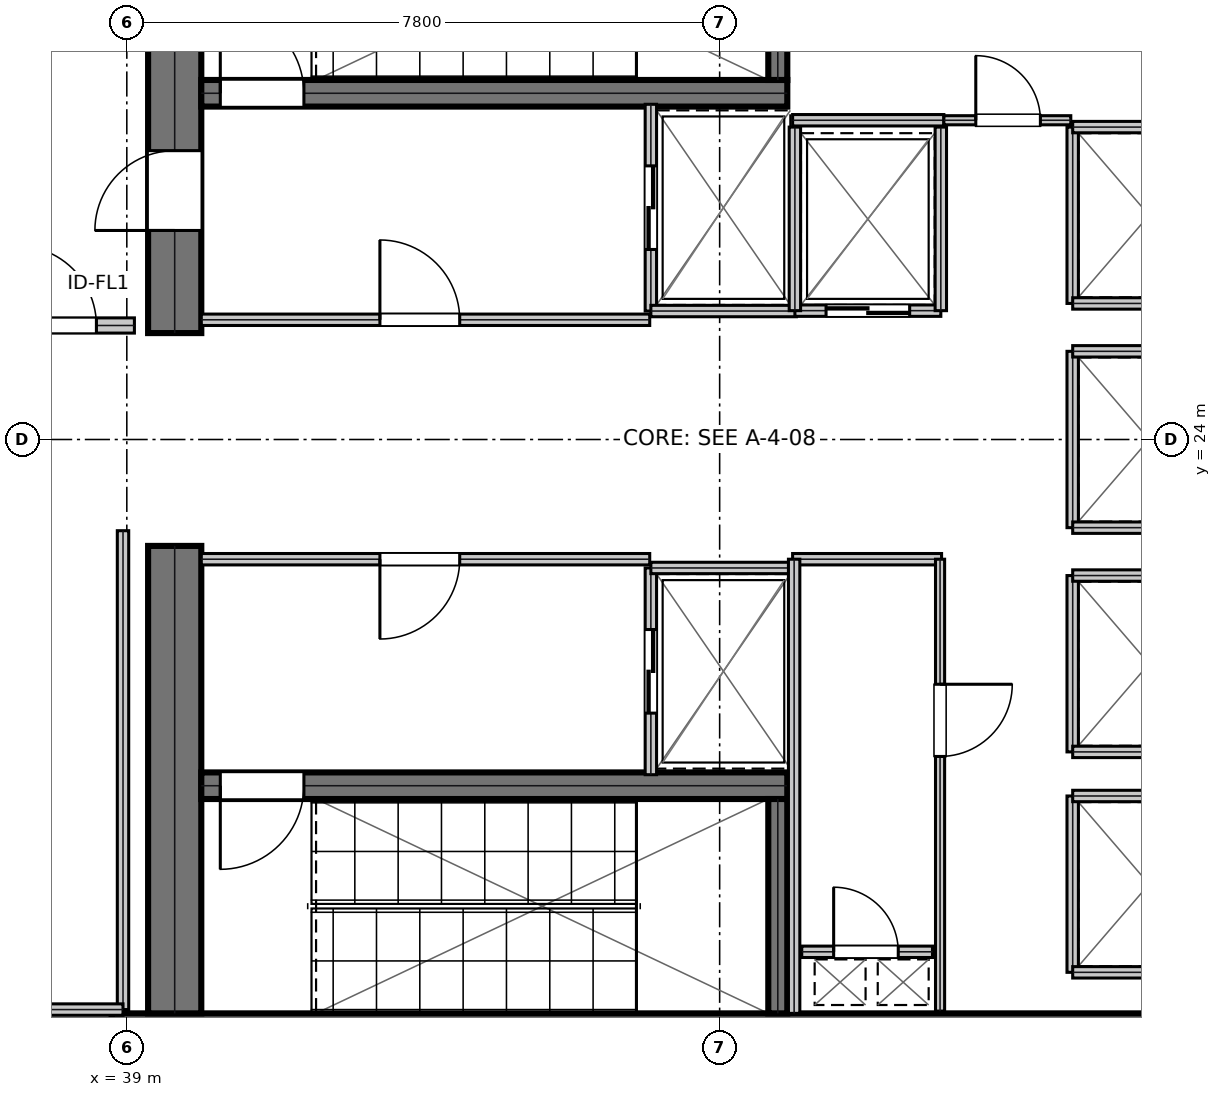
"""IFC4 building model, lengths in metres.
Left out: names, types, materials, properties, quantities, classifications, styles, units other than length and angle.
Written with IfcOpenShell. Run it as: python <this file> out.ifc"""

import sys

from ifc_helpers import new_model, si_unit, direction, frame, frame_2d, origin, place, context, subcontext, project, spatial, rectangle, extrude, element, fill, save


model = new_model("IFC4")
c1 = context("Model", 3, precision=1e-05, world=origin(), true_north=direction((0.0, 1.0)))
c2 = subcontext(c1, "Body", "Model", "MODEL_VIEW")
j1 = project(units=[si_unit("LENGTHUNIT", "METRE"), si_unit("PLANEANGLEUNIT", "RADIAN")], contexts=[c1])
p1 = place(None, origin())
s1 = spatial("IfcSite", under=j1, at=p1, CompositionType="ELEMENT")
p2 = place(p1, origin())
s2 = spatial("IfcBuilding", under=s1, at=p2, CompositionType="ELEMENT")
p3 = place(p2, frame((0.0, 0.0, 181.65)))
s3 = spatial("IfcBuildingStorey", under=s2, at=p3, CompositionType="ELEMENT", Elevation=181.65)
p4 = place(p3, frame((38.8, 16.1, 0.0), z_axis=(0.0, 0.0, 1.0), x_axis=(1.0, 0.0, 0.0)))
e1 = element("IfcWall", 1, at=p4, inside=s3, PredefinedType="SHEAR", context=c2, shape_type="SweptSolid", body=[
    extrude(rectangle(XDim=16.0, YDim=0.7, at=frame_2d((8.0, 0.0))), origin(), (0.0, 0.0, 1.0), 5.12),
])
p5 = place(p3, frame((39.63, 16.45, 0.0), z_axis=(0.0, 0.0, 1.0), x_axis=(0.0, 1.0, 0.0)))
e2 = element("IfcWall", 2, at=p5, inside=s3, PredefinedType="SHEAR", context=c2, shape_type="SweptSolid", body=[
    extrude(rectangle(XDim=6.15, YDim=0.7, at=frame_2d((3.075, 0.0))), origin(), (0.0, 0.0, 1.0), 5.12),
])
p6 = place(p3, frame((39.63, 25.4, 0.0), z_axis=(0.0, 0.0, 1.0), x_axis=(0.0, 1.0, 0.0)))
e3 = element("IfcWall", 3, at=p6, inside=s3, PredefinedType="SHEAR", context=c2, shape_type="SweptSolid", body=[
    extrude(rectangle(XDim=6.15, YDim=0.7, at=frame_2d((3.075, 0.0))), origin(), (0.0, 0.0, 1.0), 5.12),
])
p7 = place(p6, frame((1.35, 0.0, 0.0)))
e4 = element("IfcOpeningElement", 4, at=p7, cuts=e3, PredefinedType="OPENING", context=c2, shape_type="SweptSolid", body=[
    extrude(rectangle(XDim=1.05, YDim=2.15, at=frame_2d((0.525, 1.075))), frame((0.0, 0.36, 0.0), z_axis=(0.0, -1.0, 0.0), x_axis=(1.0, 0.0, 0.0)), (0.0, 0.0, 1.0), 0.72),
])
p8 = place(p3, frame((39.98, 28.555, 0.0), z_axis=(0.0, 0.0, 1.0), x_axis=(1.0, 0.0, 0.0)))
e5 = element("IfcWall", 5, at=p8, inside=s3, PredefinedType="SHEAR", context=c2, shape_type="SweptSolid", body=[
    extrude(rectangle(XDim=7.71, YDim=0.35, at=frame_2d((3.855, 0.0))), origin(), (0.0, 0.0, 1.0), 5.12),
])
p9 = place(p8, frame((0.25, 0.0, 0.0)))
e6 = element("IfcOpeningElement", 6, at=p9, cuts=e5, PredefinedType="OPENING", context=c2, shape_type="SweptSolid", body=[
    extrude(rectangle(XDim=1.1, YDim=2.15, at=frame_2d((0.55, 1.075))), frame((0.0, 0.185, 0.0), z_axis=(0.0, -1.0, 0.0), x_axis=(1.0, 0.0, 0.0)), (0.0, 0.0, 1.0), 0.37),
])
p10 = place(p3, frame((39.98, 19.445, 0.0), z_axis=(0.0, 0.0, 1.0), x_axis=(1.0, 0.0, 0.0)))
e7 = element("IfcWall", 7, at=p10, inside=s3, PredefinedType="SHEAR", context=c2, shape_type="SweptSolid", body=[
    extrude(rectangle(XDim=7.71, YDim=0.35, at=frame_2d((3.855, 0.0))), origin(), (0.0, 0.0, 1.0), 5.12),
])
p11 = place(p10, frame((0.25, 0.0, 0.0)))
e8 = element("IfcOpeningElement", 8, at=p11, cuts=e7, PredefinedType="OPENING", context=c2, shape_type="SweptSolid", body=[
    extrude(rectangle(XDim=1.1, YDim=2.15, at=frame_2d((0.55, 1.075))), frame((0.0, 0.185, 0.0), z_axis=(0.0, -1.0, 0.0), x_axis=(1.0, 0.0, 0.0)), (0.0, 0.0, 1.0), 0.37),
])
for number, where, z_axis, x_axis in (
    (9, (47.565, 28.73, 0.0), (0.0, 0.0, 1.0), (0.0, 1.0, 0.0)),
    (10, (47.565, 16.45, 0.0), (0.0, 0.0, 1.0), (0.0, 1.0, 0.0)),
):
    element("IfcWall", number, at=place(p3, frame(where, z_axis=z_axis, x_axis=x_axis)), inside=s3, PredefinedType="SHEAR", context=c2, shape_type="SweptSolid", body=[
        extrude(rectangle(XDim=2.82, YDim=0.25, at=frame_2d((1.41, 0.0))), origin(), (0.0, 0.0, 1.0), 5.12),
    ])
p12 = place(p3, frame((39.98, 25.575, 0.0), z_axis=(0.0, 0.0, 1.0), x_axis=(1.0, 0.0, 0.0)))
e11 = element("IfcWall", 11, at=p12, inside=s3, PredefinedType="PARTITIONING", context=c2, shape_type="SweptSolid", body=[
    extrude(rectangle(XDim=5.9, YDim=0.15, at=frame_2d((2.95, 0.0))), origin(), (0.0, 0.0, 1.0), 5.12),
])
p13 = place(p12, frame((2.35, 0.0, 0.0)))
e12 = element("IfcOpeningElement", 12, at=p13, cuts=e11, PredefinedType="OPENING", context=c2, shape_type="SweptSolid", body=[
    extrude(rectangle(XDim=1.05, YDim=2.15, at=frame_2d((0.525, 1.075))), frame((0.0, 0.085, 0.0), z_axis=(0.0, -1.0, 0.0), x_axis=(1.0, 0.0, 0.0)), (0.0, 0.0, 1.0), 0.17),
])
p14 = place(p3, frame((39.98, 22.425, 0.0), z_axis=(0.0, 0.0, 1.0), x_axis=(1.0, 0.0, 0.0)))
e13 = element("IfcWall", 13, at=p14, inside=s3, PredefinedType="PARTITIONING", context=c2, shape_type="SweptSolid", body=[
    extrude(rectangle(XDim=5.9, YDim=0.15, at=frame_2d((2.95, 0.0))), origin(), (0.0, 0.0, 1.0), 5.12),
])
p15 = place(p14, frame((2.35, 0.0, 0.0)))
e14 = element("IfcOpeningElement", 14, at=p15, cuts=e13, PredefinedType="OPENING", context=c2, shape_type="SweptSolid", body=[
    extrude(rectangle(XDim=1.05, YDim=2.15, at=frame_2d((0.525, 1.075))), frame((0.0, 0.085, 0.0), z_axis=(0.0, -1.0, 0.0), x_axis=(1.0, 0.0, 0.0)), (0.0, 0.0, 1.0), 0.17),
])
p16 = place(p3, frame((45.895, 25.69, 0.0), z_axis=(0.0, 0.0, 1.0), x_axis=(0.0, 1.0, 0.0)))
e15 = element("IfcWall", 15, at=p16, inside=s3, PredefinedType="PARTITIONING", context=c2, shape_type="SweptSolid", body=[
    extrude(rectangle(XDim=2.72, YDim=0.15, at=frame_2d((1.36, 0.0))), origin(), (0.0, 0.0, 1.0), 5.12),
])
p17 = place(p16, frame((0.81, 0.0, 0.0)))
e16 = element("IfcOpeningElement", 16, at=p17, cuts=e15, PredefinedType="OPENING", context=c2, shape_type="SweptSolid", body=[
    extrude(rectangle(XDim=1.1, YDim=2.15, at=frame_2d((0.55, 1.075))), frame((0.0, 0.085, 0.0), z_axis=(0.0, -1.0, 0.0), x_axis=(1.0, 0.0, 0.0)), (0.0, 0.0, 1.0), 0.17),
])
p18 = place(p3, frame((45.895, 25.69, 0.0), z_axis=(0.0, 0.0, 1.0), x_axis=(1.0, 0.0, 0.0)))
e17 = element("IfcWall", 17, at=p18, inside=s3, PredefinedType="PARTITIONING", context=c2, shape_type="SweptSolid", body=[
    extrude(rectangle(XDim=1.915, YDim=0.15, at=frame_2d((0.958, 0.0))), origin(), (0.0, 0.0, 1.0), 5.12),
])
p19 = place(p3, frame((45.895, 19.59, 0.0), z_axis=(0.0, 0.0, 1.0), x_axis=(0.0, 1.0, 0.0)))
e18 = element("IfcWall", 18, at=p19, inside=s3, PredefinedType="PARTITIONING", context=c2, shape_type="SweptSolid", body=[
    extrude(rectangle(XDim=2.72, YDim=0.15, at=frame_2d((1.36, 0.0))), origin(), (0.0, 0.0, 1.0), 5.12),
])
p20 = place(p19, frame((0.81, 0.0, 0.0)))
e19 = element("IfcOpeningElement", 19, at=p20, cuts=e18, PredefinedType="OPENING", context=c2, shape_type="SweptSolid", body=[
    extrude(rectangle(XDim=1.1, YDim=2.15, at=frame_2d((0.55, 1.075))), frame((0.0, 0.085, 0.0), z_axis=(0.0, -1.0, 0.0), x_axis=(1.0, 0.0, 0.0)), (0.0, 0.0, 1.0), 0.17),
])
p21 = place(p3, frame((45.895, 22.31, 0.0), z_axis=(0.0, 0.0, 1.0), x_axis=(1.0, 0.0, 0.0)))
e20 = element("IfcWall", 20, at=p21, inside=s3, PredefinedType="PARTITIONING", context=c2, shape_type="SweptSolid", body=[
    extrude(rectangle(XDim=1.915, YDim=0.15, at=frame_2d((0.958, 0.0))), origin(), (0.0, 0.0, 1.0), 5.12),
])
p22 = place(p3, frame((47.79, 25.695, 0.0), z_axis=(0.0, 0.0, 1.0), x_axis=(1.0, 0.0, 0.0)))
e21 = element("IfcWall", 21, at=p22, inside=s3, PredefinedType="PARTITIONING", context=c2, shape_type="SweptSolid", body=[
    extrude(rectangle(XDim=1.92, YDim=0.15, at=frame_2d((0.96, 0.0))), origin(), (0.0, 0.0, 1.0), 5.12),
])
p23 = place(p22, frame((0.41, 0.0, 0.0)))
e22 = element("IfcOpeningElement", 22, at=p23, cuts=e21, PredefinedType="OPENING", context=c2, shape_type="SweptSolid", body=[
    extrude(rectangle(XDim=1.1, YDim=2.15, at=frame_2d((0.55, 1.075))), frame((0.0, 0.085, 0.0), z_axis=(0.0, -1.0, 0.0), x_axis=(1.0, 0.0, 0.0)), (0.0, 0.0, 1.0), 0.17),
])
for number, where, z_axis, x_axis in (
    (23, (47.79, 25.695, 0.0), (0.0, 0.0, 1.0), (0.0, 1.0, 0.0)),
    (24, (49.71, 25.695, 0.0), (0.0, 0.0, 1.0), (0.0, 1.0, 0.0)),
):
    element("IfcWall", number, at=place(p3, frame(where, z_axis=z_axis, x_axis=x_axis)), inside=s3, PredefinedType="PARTITIONING", context=c2, shape_type="SweptSolid", body=[
        extrude(rectangle(XDim=2.415, YDim=0.15, at=frame_2d((1.208, 0.0))), origin(), (0.0, 0.0, 1.0), 5.12),
    ])
p24 = place(p3, frame((51.445, 25.79, 0.0), z_axis=(0.0, 0.0, 1.0), x_axis=(0.0, 1.0, 0.0)))
e25 = element("IfcWall", 25, at=p24, inside=s3, PredefinedType="PARTITIONING", context=c2, shape_type="SweptSolid", body=[
    extrude(rectangle(XDim=2.32, YDim=0.15, at=frame_2d((1.16, 0.0))), origin(), (0.0, 0.0, 1.0), 5.12),
])
for number, where, z_axis, x_axis in (
    (26, (51.445, 25.79, 0.0), (0.0, 0.0, 1.0), (1.0, 0.0, 0.0)),
    (27, (51.445, 28.11, 0.0), (0.0, 0.0, 1.0), (1.0, 0.0, 0.0)),
):
    element("IfcWall", number, at=place(p3, frame(where, z_axis=z_axis, x_axis=x_axis)), inside=s3, PredefinedType="PARTITIONING", context=c2, shape_type="SweptSolid", body=[
        extrude(rectangle(XDim=2.015, YDim=0.15, at=frame_2d((1.007, 0.0))), origin(), (0.0, 0.0, 1.0), 5.12),
    ])
p25 = place(p3, frame((51.445, 19.89, 0.0), z_axis=(0.0, 0.0, 1.0), x_axis=(0.0, 1.0, 0.0)))
e28 = element("IfcWall", 28, at=p25, inside=s3, PredefinedType="PARTITIONING", context=c2, shape_type="SweptSolid", body=[
    extrude(rectangle(XDim=2.32, YDim=0.15, at=frame_2d((1.16, 0.0))), origin(), (0.0, 0.0, 1.0), 5.12),
])
for number, where, z_axis, x_axis in (
    (29, (51.445, 19.89, 0.0), (0.0, 0.0, 1.0), (1.0, 0.0, 0.0)),
    (30, (51.445, 22.21, 0.0), (0.0, 0.0, 1.0), (1.0, 0.0, 0.0)),
):
    element("IfcWall", number, at=place(p3, frame(where, z_axis=z_axis, x_axis=x_axis)), inside=s3, PredefinedType="PARTITIONING", context=c2, shape_type="SweptSolid", body=[
        extrude(rectangle(XDim=2.015, YDim=0.15, at=frame_2d((1.007, 0.0))), origin(), (0.0, 0.0, 1.0), 5.12),
    ])
p26 = place(p3, frame((51.445, 22.84, 0.0), z_axis=(0.0, 0.0, 1.0), x_axis=(0.0, 1.0, 0.0)))
e31 = element("IfcWall", 31, at=p26, inside=s3, PredefinedType="PARTITIONING", context=c2, shape_type="SweptSolid", body=[
    extrude(rectangle(XDim=2.32, YDim=0.15, at=frame_2d((1.16, 0.0))), origin(), (0.0, 0.0, 1.0), 5.12),
])
for number, where, z_axis, x_axis in (
    (32, (51.445, 22.84, 0.0), (0.0, 0.0, 1.0), (1.0, 0.0, 0.0)),
    (33, (51.445, 25.16, 0.0), (0.0, 0.0, 1.0), (1.0, 0.0, 0.0)),
):
    element("IfcWall", number, at=place(p3, frame(where, z_axis=z_axis, x_axis=x_axis)), inside=s3, PredefinedType="PARTITIONING", context=c2, shape_type="SweptSolid", body=[
        extrude(rectangle(XDim=2.015, YDim=0.15, at=frame_2d((1.007, 0.0))), origin(), (0.0, 0.0, 1.0), 5.12),
    ])
p27 = place(p3, frame((51.445, 16.99, 0.0), z_axis=(0.0, 0.0, 1.0), x_axis=(0.0, 1.0, 0.0)))
e34 = element("IfcWall", 34, at=p27, inside=s3, PredefinedType="PARTITIONING", context=c2, shape_type="SweptSolid", body=[
    extrude(rectangle(XDim=2.32, YDim=0.15, at=frame_2d((1.16, 0.0))), origin(), (0.0, 0.0, 1.0), 5.12),
])
for number, where, z_axis, x_axis in (
    (35, (51.445, 16.99, 0.0), (0.0, 0.0, 1.0), (1.0, 0.0, 0.0)),
    (36, (51.445, 19.31, 0.0), (0.0, 0.0, 1.0), (1.0, 0.0, 0.0)),
):
    element("IfcWall", number, at=place(p3, frame(where, z_axis=z_axis, x_axis=x_axis)), inside=s3, PredefinedType="PARTITIONING", context=c2, shape_type="SweptSolid", body=[
        extrude(rectangle(XDim=2.015, YDim=0.15, at=frame_2d((1.007, 0.0))), origin(), (0.0, 0.0, 1.0), 5.12),
    ])
p28 = place(p3, frame((47.88, 17.26, 0.0), z_axis=(0.0, 0.0, 1.0), x_axis=(1.0, 0.0, 0.0)))
e37 = element("IfcWall", 37, at=p28, inside=s3, PredefinedType="PARTITIONING", context=c2, shape_type="SweptSolid", body=[
    extrude(rectangle(XDim=1.72, YDim=0.15, at=frame_2d((0.86, 0.0))), origin(), (0.0, 0.0, 1.0), 5.12),
])
p29 = place(p28, frame((0.42, 0.0, 0.0)))
e38 = element("IfcOpeningElement", 38, at=p29, cuts=e37, PredefinedType="OPENING", context=c2, shape_type="SweptSolid", body=[
    extrude(rectangle(XDim=0.85, YDim=2.15, at=frame_2d((0.425, 1.075))), frame((0.0, 0.085, 0.0), z_axis=(0.0, -1.0, 0.0), x_axis=(1.0, 0.0, 0.0)), (0.0, 0.0, 1.0), 0.17),
])
p30 = place(p3, frame((47.76, 22.425, 0.0), z_axis=(0.0, 0.0, 1.0), x_axis=(1.0, 0.0, 0.0)))
e39 = element("IfcWall", 39, at=p30, inside=s3, PredefinedType="PARTITIONING", context=c2, shape_type="SweptSolid", body=[
    extrude(rectangle(XDim=1.96, YDim=0.15, at=frame_2d((0.98, 0.0))), origin(), (0.0, 0.0, 1.0), 5.12),
])
p31 = place(p3, frame((47.78, 16.45, 0.0), z_axis=(0.0, 0.0, 1.0), x_axis=(0.0, 1.0, 0.0)))
e40 = element("IfcWall", 40, at=p31, inside=s3, PredefinedType="PARTITIONING", context=c2, shape_type="SweptSolid", body=[
    extrude(rectangle(XDim=5.975, YDim=0.15, at=frame_2d((2.988, 0.0))), origin(), (0.0, 0.0, 1.0), 5.12),
])
p32 = place(p3, frame((49.7, 16.48, 0.0), z_axis=(0.0, 0.0, 1.0), x_axis=(0.0, 1.0, 0.0)))
e41 = element("IfcWall", 41, at=p32, inside=s3, PredefinedType="PARTITIONING", context=c2, shape_type="SweptSolid", body=[
    extrude(rectangle(XDim=5.945, YDim=0.12, at=frame_2d((2.973, 0.0))), origin(), (0.0, 0.0, 1.0), 5.12),
])
p33 = place(p32, frame((3.35, 0.0, 0.0)))
e42 = element("IfcOpeningElement", 42, at=p33, cuts=e41, PredefinedType="OPENING", context=c2, shape_type="SweptSolid", body=[
    extrude(rectangle(XDim=0.95, YDim=2.15, at=frame_2d((0.475, 1.075))), frame((0.0, 0.07, 0.0), z_axis=(0.0, -1.0, 0.0), x_axis=(1.0, 0.0, 0.0)), (0.0, 0.0, 1.0), 0.14),
])
p34 = place(p3, frame((47.76, 28.2, 0.0), z_axis=(0.0, 0.0, 1.0), x_axis=(1.0, 0.0, 0.0)))
e43 = element("IfcWall", 43, at=p34, inside=s3, PredefinedType="PARTITIONING", context=c2, shape_type="SweptSolid", body=[
    extrude(rectangle(XDim=1.99, YDim=0.15, at=frame_2d((0.995, 0.0))), origin(), (0.0, 0.0, 1.0), 5.12),
])
p35 = place(p3, frame((49.75, 28.2, 0.0), z_axis=(0.0, 0.0, 1.0), x_axis=(1.0, 0.0, 0.0)))
e44 = element("IfcWall", 44, at=p35, inside=s3, PredefinedType="PARTITIONING", context=c2, shape_type="SweptSolid", body=[
    extrude(rectangle(XDim=1.67, YDim=0.12, at=frame_2d((0.835, 0.0))), origin(), (0.0, 0.0, 1.0), 5.12),
])
p36 = place(p35, frame((0.42, 0.0, 0.0)))
e45 = element("IfcOpeningElement", 45, at=p36, cuts=e44, PredefinedType="OPENING", context=c2, shape_type="SweptSolid", body=[
    extrude(rectangle(XDim=0.85, YDim=2.15, at=frame_2d((0.425, 1.075))), frame((0.0, 0.07, 0.0), z_axis=(0.0, -1.0, 0.0), x_axis=(1.0, 0.0, 0.0)), (0.0, 0.0, 1.0), 0.14),
])
p37 = place(p3, frame((22.15, 25.5, 0.0), z_axis=(0.0, 0.0, 1.0), x_axis=(1.0, 0.0, 0.0)))
e46 = element("IfcWall", 46, at=p37, inside=s3, PredefinedType="SOLIDWALL", context=c2, shape_type="SweptSolid", body=[
    extrude(rectangle(XDim=16.95, YDim=0.2, at=frame_2d((8.475, 0.0))), origin(), (0.0, 0.0, 1.0), 4.571),
])
p38 = place(p37, frame((15.4, 0.0, 0.0)))
e47 = element("IfcOpeningElement", 47, at=p38, cuts=e46, PredefinedType="OPENING", context=c2, shape_type="SweptSolid", body=[
    extrude(rectangle(XDim=1.05, YDim=2.15, at=frame_2d((0.525, 1.075))), frame((0.0, 0.11, 0.0), z_axis=(0.0, -1.0, 0.0), x_axis=(1.0, 0.0, 0.0)), (0.0, 0.0, 1.0), 0.22),
])
p39 = place(p3, frame((38.95, 16.5, 0.0), z_axis=(0.0, 0.0, 1.0), x_axis=(0.0, 1.0, 0.0)))
e48 = element("IfcWall", 48, at=p39, inside=s3, PredefinedType="PARTITIONING", context=c2, shape_type="SweptSolid", body=[
    extrude(rectangle(XDim=6.3, YDim=0.15, at=frame_2d((3.15, 0.0))), origin(), (0.0, 0.0, 1.0), 4.798),
])
p40 = place(p3, frame((37.05, 16.5, 0.0), z_axis=(0.0, 0.0, 1.0), x_axis=(1.0, 0.0, 0.0)))
e49 = element("IfcWall", 49, at=p40, inside=s3, PredefinedType="PARTITIONING", context=c2, shape_type="SweptSolid", body=[
    extrude(rectangle(XDim=1.9, YDim=0.15, at=frame_2d((0.95, 0.0))), origin(), (0.0, 0.0, 1.0), 5.12),
])
p41 = place(p13, origin())
e50 = element("IfcDoor", 50, at=p41, inside=s3, OperationType="SINGLE_SWING_LEFT", PredefinedType="DOOR", context=c2, shape_type="SweptSolid", body=[
    extrude(rectangle(XDim=1.05, YDim=2.15, at=frame_2d((0.525, 1.075))), frame((0.0, 0.025, 0.0), z_axis=(0.0, -1.0, 0.0), x_axis=(1.0, 0.0, 0.0)), (0.0, 0.0, 1.0), 0.05),
])
fill(e12, e50)
p42 = place(p15, frame((1.05, 0.0, 0.0), z_axis=(0.0, 0.0, 1.0), x_axis=(-1.0, 0.0, 0.0)))
e51 = element("IfcDoor", 51, at=p42, inside=s3, OperationType="SINGLE_SWING_RIGHT", PredefinedType="DOOR", context=c2, shape_type="SweptSolid", body=[
    extrude(rectangle(XDim=1.05, YDim=2.15, at=frame_2d((0.525, 1.075))), frame((0.0, 0.025, 0.0), z_axis=(0.0, -1.0, 0.0), x_axis=(1.0, 0.0, 0.0)), (0.0, 0.0, 1.0), 0.05),
])
fill(e14, e51)
p43 = place(p17, frame((1.1, 0.0, 0.0), z_axis=(0.0, 0.0, 1.0), x_axis=(-1.0, 0.0, 0.0)))
e52 = element("IfcDoor", 52, at=p43, inside=s3, OperationType="DOUBLE_DOOR_SLIDING", PredefinedType="DOOR", context=c2, shape_type="SweptSolid", body=[
    extrude(rectangle(XDim=1.1, YDim=2.15, at=frame_2d((0.55, 1.075))), frame((0.0, 0.025, 0.0), z_axis=(0.0, -1.0, 0.0), x_axis=(1.0, 0.0, 0.0)), (0.0, 0.0, 1.0), 0.05),
])
fill(e16, e52)
p44 = place(p20, frame((1.1, 0.0, 0.0), z_axis=(0.0, 0.0, 1.0), x_axis=(-1.0, 0.0, 0.0)))
e53 = element("IfcDoor", 53, at=p44, inside=s3, OperationType="DOUBLE_DOOR_SLIDING", PredefinedType="DOOR", context=c2, shape_type="SweptSolid", body=[
    extrude(rectangle(XDim=1.1, YDim=2.15, at=frame_2d((0.55, 1.075))), frame((0.0, 0.025, 0.0), z_axis=(0.0, -1.0, 0.0), x_axis=(1.0, 0.0, 0.0)), (0.0, 0.0, 1.0), 0.05),
])
fill(e19, e53)
p45 = place(p23, frame((1.1, 0.0, 0.0), z_axis=(0.0, 0.0, 1.0), x_axis=(-1.0, 0.0, 0.0)))
e54 = element("IfcDoor", 54, at=p45, inside=s3, OperationType="DOUBLE_DOOR_SLIDING", PredefinedType="DOOR", context=c2, shape_type="SweptSolid", body=[
    extrude(rectangle(XDim=1.1, YDim=2.15, at=frame_2d((0.55, 1.075))), frame((0.0, 0.025, 0.0), z_axis=(0.0, -1.0, 0.0), x_axis=(1.0, 0.0, 0.0)), (0.0, 0.0, 1.0), 0.05),
])
fill(e22, e54)
p46 = place(p29, origin())
e55 = element("IfcDoor", 55, at=p46, inside=s3, OperationType="SINGLE_SWING_LEFT", PredefinedType="TRAPDOOR", context=c2, shape_type="SweptSolid", body=[
    extrude(rectangle(XDim=0.85, YDim=2.15, at=frame_2d((0.425, 1.075))), frame((0.0, 0.025, 0.0), z_axis=(0.0, -1.0, 0.0), x_axis=(1.0, 0.0, 0.0)), (0.0, 0.0, 1.0), 0.05),
])
fill(e38, e55)
p47 = place(p33, frame((0.95, 0.0, 0.0), z_axis=(0.0, 0.0, 1.0), x_axis=(-1.0, 0.0, 0.0)))
e56 = element("IfcDoor", 56, at=p47, inside=s3, OperationType="SINGLE_SWING_LEFT", PredefinedType="DOOR", context=c2, shape_type="SweptSolid", body=[
    extrude(rectangle(XDim=0.95, YDim=2.15, at=frame_2d((0.475, 1.075))), frame((0.0, 0.025, 0.0), z_axis=(0.0, -1.0, 0.0), x_axis=(1.0, 0.0, 0.0)), (0.0, 0.0, 1.0), 0.05),
])
fill(e42, e56)
p48 = place(p36, origin())
e57 = element("IfcDoor", 57, at=p48, inside=s3, OperationType="SINGLE_SWING_LEFT", PredefinedType="DOOR", context=c2, shape_type="SweptSolid", body=[
    extrude(rectangle(XDim=0.85, YDim=2.15, at=frame_2d((0.425, 1.075))), frame((0.0, 0.025, 0.0), z_axis=(0.0, -1.0, 0.0), x_axis=(1.0, 0.0, 0.0)), (0.0, 0.0, 1.0), 0.05),
])
fill(e45, e57)
p49 = place(p38, origin())
e58 = element("IfcDoor", 58, at=p49, inside=s3, OperationType="SINGLE_SWING_LEFT", PredefinedType="DOOR", context=c2, shape_type="SweptSolid", body=[
    extrude(rectangle(XDim=1.05, YDim=2.15, at=frame_2d((0.525, 1.075))), frame((0.0, 0.025, 0.0), z_axis=(0.0, -1.0, 0.0), x_axis=(1.0, 0.0, 0.0)), (0.0, 0.0, 1.0), 0.05),
])
fill(e47, e58)
p50 = place(p9, origin())
e59 = element("IfcDoor", 59, at=p50, inside=s3, OperationType="SINGLE_SWING_LEFT", PredefinedType="DOOR", context=c2, shape_type="SweptSolid", body=[
    extrude(rectangle(XDim=1.1, YDim=2.15, at=frame_2d((0.55, 1.075))), frame((0.0, 0.025, 0.0), z_axis=(0.0, -1.0, 0.0), x_axis=(1.0, 0.0, 0.0)), (0.0, 0.0, 1.0), 0.05),
])
fill(e6, e59)
p51 = place(p11, frame((1.1, 0.0, 0.0), z_axis=(0.0, 0.0, 1.0), x_axis=(-1.0, 0.0, 0.0)))
e60 = element("IfcDoor", 60, at=p51, inside=s3, OperationType="SINGLE_SWING_RIGHT", PredefinedType="DOOR", context=c2, shape_type="SweptSolid", body=[
    extrude(rectangle(XDim=1.1, YDim=2.15, at=frame_2d((0.55, 1.075))), frame((0.0, 0.025, 0.0), z_axis=(0.0, -1.0, 0.0), x_axis=(1.0, 0.0, 0.0)), (0.0, 0.0, 1.0), 0.05),
])
fill(e8, e60)
p52 = place(p7, origin())
e61 = element("IfcDoor", 61, at=p52, inside=s3, OperationType="SINGLE_SWING_LEFT", PredefinedType="DOOR", context=c2, shape_type="SweptSolid", body=[
    extrude(rectangle(XDim=1.05, YDim=2.15, at=frame_2d((0.525, 1.075))), frame((0.0, 0.025, 0.0), z_axis=(0.0, -1.0, 0.0), x_axis=(1.0, 0.0, 0.0)), (0.0, 0.0, 1.0), 0.05),
])
fill(e4, e61)
save(model, sys.argv[1])
